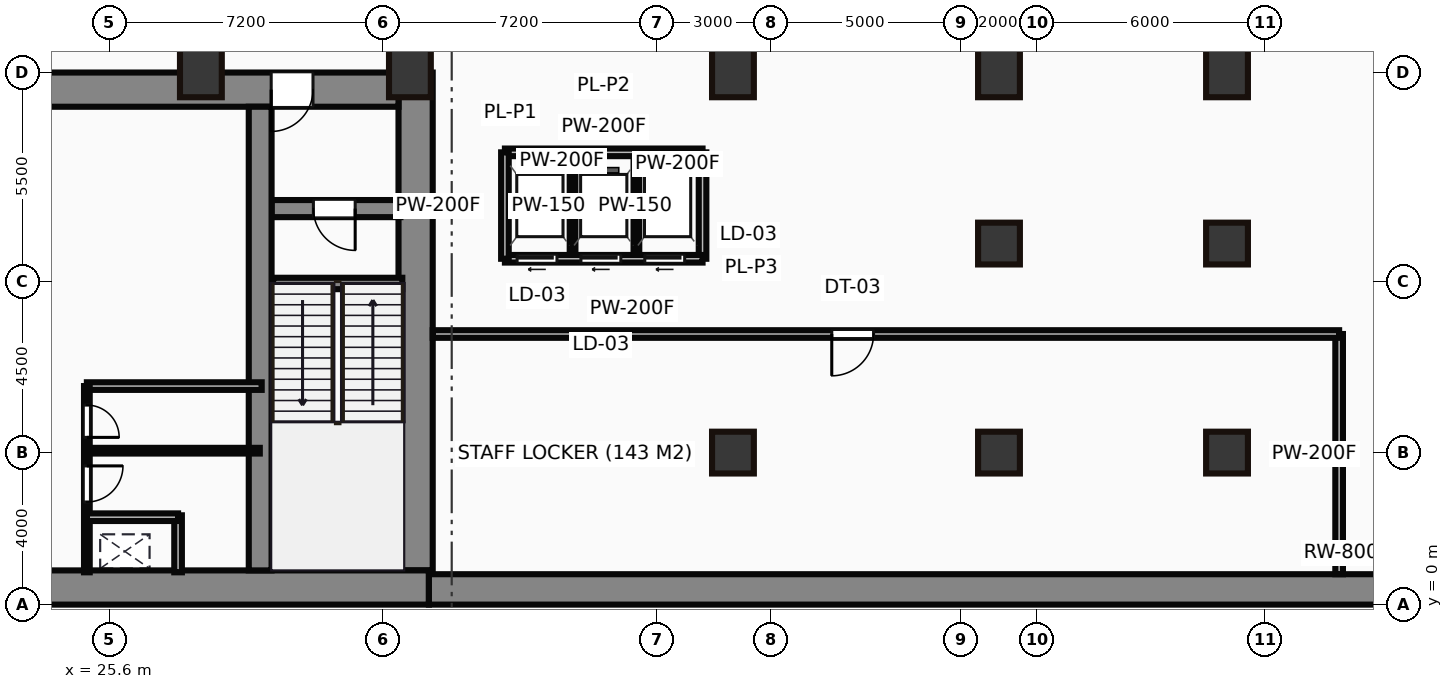
"""IFC4 building model, lengths in metres.
Left out: names, types, materials, properties, quantities, classifications, styles, units other than length and angle.
Written with IfcOpenShell. Run it as: python <this file> out.ifc"""

import sys

from ifc_helpers import new_model, si_unit, direction, frame, frame_2d, origin, origin_2d, place, context, subcontext, project, spatial, rectangle, hollow_rectangle, extrude, source, transform, mapped, element, fill, save


model = new_model("IFC4")
c1 = context("Model", 3, precision=1e-05, world=origin(), true_north=direction((0.0, 1.0)))
c2 = subcontext(c1, "Body", "Model", "MODEL_VIEW")
j1 = project(units=[si_unit("LENGTHUNIT", "METRE"), si_unit("PLANEANGLEUNIT", "RADIAN")], contexts=[c1])
p1 = place(None, origin())
s1 = spatial("IfcSite", under=j1, at=p1, CompositionType="ELEMENT")
p2 = place(p1, origin())
s2 = spatial("IfcBuilding", under=s1, at=p2, CompositionType="ELEMENT")
p3 = place(p2, frame((0.0, 0.0, -10.0)))
s3 = spatial("IfcBuildingStorey", under=s2, at=p3, CompositionType="ELEMENT", Elevation=-10.0)
m1 = source(origin(), c2, "Body", "SweptSolid", [
    extrude(rectangle(XDim=48.0, YDim=0.8, at=frame_2d((24.0, 0.0))), origin(), (0.0, 0.0, 1.0), 5.0),
])
p4 = place(p3, frame((34.0, 0.4, 0.0), z_axis=(0.0, 0.0, 1.0), x_axis=(1.0, 0.0, 0.0)))
e1 = element("IfcWall", 1, at=p4, inside=s3, PredefinedType="USERDEFINED", context=c2, shape_type="MappedRepresentation", body=[
    mapped(m1, transform((0.0, 0.0, 0.0))),
])
m2 = source(origin(), c2, "Body", "SweptSolid", [
    extrude(rectangle(XDim=29.5, YDim=0.9, at=frame_2d((14.75, 0.0))), origin(), (0.0, 0.0, 1.0), 5.0),
])
p5 = place(p3, frame((4.5, 0.45, 0.0), z_axis=(0.0, 0.0, 1.0), x_axis=(1.0, 0.0, 0.0)))
e2 = element("IfcWall", 2, at=p5, inside=s3, PredefinedType="SHEAR", context=c2, shape_type="MappedRepresentation", body=[
    mapped(m2, transform((0.0, 0.0, 0.0))),
])
m3 = source(origin(), c2, "Body", "SweptSolid", [
    extrude(rectangle(XDim=13.1, YDim=0.9, at=frame_2d((6.55, 0.0))), origin(), (0.0, 0.0, 1.0), 5.0),
])
p6 = place(p3, frame((33.65, 0.9, 0.0), z_axis=(0.0, 0.0, 1.0), x_axis=(0.0, 1.0, 0.0)))
e3 = element("IfcWall", 3, at=p6, inside=s3, PredefinedType="SHEAR", context=c2, shape_type="MappedRepresentation", body=[
    mapped(m3, transform((0.0, 0.0, 0.0))),
])
m4 = source(origin(), c2, "Body", "SweptSolid", [
    extrude(rectangle(XDim=12.6, YDim=0.9, at=frame_2d((6.3, 0.0))), origin(), (0.0, 0.0, 1.0), 4.55),
])
p7 = place(p3, frame((20.6, 13.55, 0.45), z_axis=(0.0, 0.0, 1.0), x_axis=(1.0, 0.0, 0.0)))
e4 = element("IfcWall", 4, at=p7, inside=s3, PredefinedType="SHEAR", context=c2, shape_type="MappedRepresentation", body=[
    mapped(m4, transform((0.0, 0.0, 0.0))),
])
p8 = place(p7, frame((9.25, 0.0, 0.0)))
e5 = element("IfcOpeningElement", 5, at=p8, cuts=e4, PredefinedType="OPENING", context=c2, shape_type="SweptSolid", body=[
    extrude(rectangle(XDim=1.1, YDim=2.15, at=frame_2d((0.55, 1.075))), frame((0.0, 0.46, 0.0), z_axis=(0.0, -1.0, 0.0), x_axis=(1.0, 0.0, 0.0)), (0.0, 0.0, 1.0), 0.92),
])
m5 = source(origin(), c2, "Body", "SweptSolid", [
    extrude(rectangle(XDim=12.2, YDim=0.6, at=frame_2d((6.1, 0.0))), origin(), (0.0, 0.0, 1.0), 5.0),
])
p9 = place(p3, frame((29.56, 0.9, 0.0), z_axis=(0.0, 0.0, 1.0), x_axis=(0.0, 1.0, 0.0)))
e6 = element("IfcWall", 6, at=p9, inside=s3, PredefinedType="SHEAR", context=c2, shape_type="MappedRepresentation", body=[
    mapped(m5, transform((0.0, 0.0, 0.0))),
])
m6 = source(origin(), c2, "Body", "SweptSolid", [
    extrude(rectangle(XDim=3.39, YDim=0.45, at=frame_2d((1.695, 0.0))), origin(), (0.0, 0.0, 1.0), 4.55),
])
p10 = place(p3, frame((29.86, 10.42, 0.45), z_axis=(0.0, 0.0, 1.0), x_axis=(1.0, 0.0, 0.0)))
e7 = element("IfcWall", 7, at=p10, inside=s3, PredefinedType="SHEAR", context=c2, shape_type="MappedRepresentation", body=[
    mapped(m6, transform((0.0, 0.0, 0.0))),
])
p11 = place(p10, frame((1.1, 0.0, 0.0)))
e8 = element("IfcOpeningElement", 8, at=p11, cuts=e7, PredefinedType="OPENING", context=c2, shape_type="SweptSolid", body=[
    extrude(rectangle(XDim=1.1, YDim=2.15, at=frame_2d((0.55, 1.075))), frame((0.0, 0.235, 0.0), z_axis=(0.0, -1.0, 0.0), x_axis=(1.0, 0.0, 0.0)), (0.0, 0.0, 1.0), 0.47),
])
m7 = source(origin(), c2, "Body", "SweptSolid", [
    extrude(rectangle(XDim=3.4, YDim=0.3, at=frame_2d((1.7, 0.0))), origin(), (0.0, 0.0, 1.0), 0.75),
])
p12 = place(p3, frame((29.9, 8.45, -0.3), z_axis=(0.0, 0.0, 1.0), x_axis=(1.0, 0.0, 0.0)))
e9 = element("IfcWall", 9, at=p12, inside=s3, PredefinedType="SHEAR", context=c2, shape_type="MappedRepresentation", body=[
    mapped(m7, transform((0.0, 0.0, 0.0))),
])
m8 = source(origin(), c2, "Body", "SweptSolid", [
    extrude(hollow_rectangle(XDim=1.1, YDim=1.3, WallThickness=0.055, at=origin_2d()), origin(), (0.0, 0.0, 1.0), 5.0),
])
for number, where, z_axis, x_axis in (
    (10, (28.0, 14.0, 0.0), (0.0, 0.0, 1.0), (1.0, 0.0, 0.0)),
    (11, (33.5, 14.0, 0.0), (0.0, 0.0, 1.0), (1.0, 0.0, 0.0)),
    (12, (42.0, 14.0, 0.0), (0.0, 0.0, 1.0), (1.0, 0.0, 0.0)),
    (13, (49.0, 14.0, 0.0), (0.0, 0.0, 1.0), (1.0, 0.0, 0.0)),
    (14, (55.0, 14.0, 0.0), (0.0, 0.0, 1.0), (1.0, 0.0, 0.0)),
):
    element("IfcColumn", number, at=place(p3, frame(where, z_axis=z_axis, x_axis=x_axis)), inside=s3, PredefinedType="PILASTER", context=c2, shape_type="MappedRepresentation", body=[
        mapped(m8, transform((0.0, 0.0, 0.0))),
    ])
m9 = source(origin(), c2, "Body", "SweptSolid", [
    extrude(hollow_rectangle(XDim=1.1, YDim=1.1, WallThickness=0.05, at=origin_2d()), origin(), (0.0, 0.0, 1.0), 5.0),
])
for number, where, z_axis, x_axis in (
    (15, (49.0, 9.5, 0.0), (0.0, 0.0, 1.0), (1.0, 0.0, 0.0)),
    (16, (55.0, 9.5, 0.0), (0.0, 0.0, 1.0), (1.0, 0.0, 0.0)),
    (17, (42.0, 4.0, 0.0), (0.0, 0.0, 1.0), (1.0, 0.0, 0.0)),
    (18, (49.0, 4.0, 0.0), (0.0, 0.0, 1.0), (1.0, 0.0, 0.0)),
    (19, (55.0, 4.0, 0.0), (0.0, 0.0, 1.0), (1.0, 0.0, 0.0)),
):
    element("IfcColumn", number, at=place(p3, frame(where, z_axis=z_axis, x_axis=x_axis)), inside=s3, PredefinedType="PILASTER", context=c2, shape_type="MappedRepresentation", body=[
        mapped(m9, transform((0.0, 0.0, 0.0))),
    ])
m10 = source(origin(), c2, "Body", "SweptSolid", [
    extrude(rectangle(XDim=4.9, YDim=0.15, at=frame_2d((2.45, 0.0))), origin(), (0.0, 0.0, 1.0), 4.25),
])
p13 = place(p3, frame((25.0, 0.85, 0.45), z_axis=(0.0, 0.0, 1.0), x_axis=(0.0, 1.0, 0.0)))
e20 = element("IfcWall", 20, at=p13, inside=s3, PredefinedType="PARTITIONING", context=c2, shape_type="MappedRepresentation", body=[
    mapped(m10, transform((0.0, 0.0, 0.0))),
])
p14 = place(p13, frame((1.85, 0.0, 0.0)))
e21 = element("IfcOpeningElement", 21, at=p14, cuts=e20, PredefinedType="OPENING", context=c2, shape_type="SweptSolid", body=[
    extrude(rectangle(XDim=0.95, YDim=2.15, at=frame_2d((0.475, 1.075))), frame((0.0, 0.085, 0.0), z_axis=(0.0, -1.0, 0.0), x_axis=(1.0, 0.0, 0.0)), (0.0, 0.0, 1.0), 0.17),
])
p15 = place(p13, frame((3.55, 0.0, 0.0)))
e22 = element("IfcOpeningElement", 22, at=p15, cuts=e20, PredefinedType="OPENING", context=c2, shape_type="SweptSolid", body=[
    extrude(rectangle(XDim=0.85, YDim=2.15, at=frame_2d((0.425, 1.075))), frame((0.0, 0.085, 0.0), z_axis=(0.0, -1.0, 0.0), x_axis=(1.0, 0.0, 0.0)), (0.0, 0.0, 1.0), 0.17),
])
m11 = source(origin(), c2, "Body", "SweptSolid", [
    extrude(rectangle(XDim=4.6, YDim=0.2, at=frame_2d((2.3, 0.0))), origin(), (0.0, 0.0, 1.0), 4.25),
])
p16 = place(p3, frame((25.0, 5.75, 0.45), z_axis=(0.0, 0.0, 1.0), x_axis=(1.0, 0.0, 0.0)))
e23 = element("IfcWall", 23, at=p16, inside=s3, PredefinedType="PARTITIONING", context=c2, shape_type="MappedRepresentation", body=[
    mapped(m11, transform((0.0, 0.0, 0.0))),
])
m12 = source(origin(), c2, "Body", "SweptSolid", [
    extrude(rectangle(XDim=2.4, YDim=0.2, at=frame_2d((1.2, 0.0))), origin(), (0.0, 0.0, 1.0), 4.25),
])
p17 = place(p3, frame((25.0, 2.3, 0.45), z_axis=(0.0, 0.0, 1.0), x_axis=(1.0, 0.0, 0.0)))
e24 = element("IfcWall", 24, at=p17, inside=s3, PredefinedType="PARTITIONING", context=c2, shape_type="MappedRepresentation", body=[
    mapped(m12, transform((0.0, 0.0, 0.0))),
])
m13 = source(origin(), c2, "Body", "SweptSolid", [
    extrude(rectangle(XDim=1.5, YDim=0.2, at=frame_2d((0.75, 0.0))), origin(), (0.0, 0.0, 1.0), 4.25),
])
p18 = place(p3, frame((27.4, 0.85, 0.45), z_axis=(0.0, 0.0, 1.0), x_axis=(0.0, 1.0, 0.0)))
e25 = element("IfcWall", 25, at=p18, inside=s3, PredefinedType="PARTITIONING", context=c2, shape_type="MappedRepresentation", body=[
    mapped(m13, transform((0.0, 0.0, 0.0))),
])
m14 = source(origin(), c2, "Body", "SweptSolid", [
    extrude(rectangle(XDim=4.55, YDim=0.15, at=frame_2d((2.275, 0.0))), origin(), (0.0, 0.0, 1.0), 4.25),
])
p19 = place(p3, frame((25.0, 4.05, 0.45), z_axis=(0.0, 0.0, 1.0), x_axis=(1.0, 0.0, 0.0)))
e26 = element("IfcWall", 26, at=p19, inside=s3, PredefinedType="PARTITIONING", context=c2, shape_type="MappedRepresentation", body=[
    mapped(m14, transform((0.0, 0.0, 0.0))),
])
m15 = source(origin(), c2, "Body", "SweptSolid", [
    extrude(rectangle(XDim=5.2, YDim=0.2, at=frame_2d((2.6, 0.0))), origin(), (0.0, 0.0, 1.0), 4.25),
])
p20 = place(p3, frame((36.0, 9.1, 0.45), z_axis=(0.0, 0.0, 1.0), x_axis=(1.0, 0.0, 0.0)))
e27 = element("IfcWall", 27, at=p20, inside=s3, PredefinedType="PARTITIONING", context=c2, shape_type="MappedRepresentation", body=[
    mapped(m15, transform((0.0, 0.0, 0.0))),
])
p21 = place(p20, frame((0.32, 0.0, 0.0)))
e28 = element("IfcOpeningElement", 28, at=p21, cuts=e27, PredefinedType="OPENING", context=c2, shape_type="SweptSolid", body=[
    extrude(rectangle(XDim=1.05, YDim=2.15, at=frame_2d((0.525, 1.075))), frame((0.0, 0.11, 0.0), z_axis=(0.0, -1.0, 0.0), x_axis=(1.0, 0.0, 0.0)), (0.0, 0.0, 1.0), 0.22),
])
p22 = place(p20, frame((2.0, 0.0, 0.0)))
e29 = element("IfcOpeningElement", 29, at=p22, cuts=e27, PredefinedType="OPENING", context=c2, shape_type="SweptSolid", body=[
    extrude(rectangle(XDim=1.05, YDim=2.15, at=frame_2d((0.525, 1.075))), frame((0.0, 0.11, 0.0), z_axis=(0.0, -1.0, 0.0), x_axis=(1.0, 0.0, 0.0)), (0.0, 0.0, 1.0), 0.22),
])
p23 = place(p20, frame((3.68, 0.0, 0.0)))
e30 = element("IfcOpeningElement", 30, at=p23, cuts=e27, PredefinedType="OPENING", context=c2, shape_type="SweptSolid", body=[
    extrude(rectangle(XDim=1.05, YDim=2.15, at=frame_2d((0.525, 1.075))), frame((0.0, 0.11, 0.0), z_axis=(0.0, -1.0, 0.0), x_axis=(1.0, 0.0, 0.0)), (0.0, 0.0, 1.0), 0.22),
])
p24 = place(p3, frame((36.0, 11.9, 0.45), z_axis=(0.0, 0.0, 1.0), x_axis=(1.0, 0.0, 0.0)))
e31 = element("IfcWall", 31, at=p24, inside=s3, PredefinedType="PARTITIONING", context=c2, shape_type="MappedRepresentation", body=[
    mapped(m15, transform((0.0, 0.0, 0.0))),
])
m16 = source(origin(), c2, "Body", "SweptSolid", [
    extrude(rectangle(XDim=2.8, YDim=0.2, at=frame_2d((1.4, 0.0))), origin(), (0.0, 0.0, 1.0), 4.25),
])
for number, where, z_axis, x_axis in (
    (32, (36.0, 9.1, 0.45), (0.0, 0.0, 1.0), (0.0, 1.0, 0.0)),
    (33, (41.2, 9.1, 0.45), (0.0, 0.0, 1.0), (0.0, 1.0, 0.0)),
):
    element("IfcWall", number, at=place(p3, frame(where, z_axis=z_axis, x_axis=x_axis)), inside=s3, PredefinedType="PARTITIONING", context=c2, shape_type="MappedRepresentation", body=[
        mapped(m16, transform((0.0, 0.0, 0.0))),
    ])
m17 = source(origin(), c2, "Body", "SweptSolid", [
    extrude(rectangle(XDim=2.7, YDim=0.15, at=frame_2d((1.35, 0.0))), origin(), (0.0, 0.0, 1.0), 4.25),
])
for number, where, z_axis, x_axis in (
    (34, (37.78, 9.15, 0.45), (0.0, 0.0, 1.0), (0.0, 1.0, 0.0)),
    (35, (39.46, 9.15, 0.45), (0.0, 0.0, 1.0), (0.0, 1.0, 0.0)),
):
    element("IfcWall", number, at=place(p3, frame(where, z_axis=z_axis, x_axis=x_axis)), inside=s3, PredefinedType="PARTITIONING", context=c2, shape_type="MappedRepresentation", body=[
        mapped(m17, transform((0.0, 0.0, 0.0))),
    ])
m18 = source(origin(), c2, "Body", "SweptSolid", [
    extrude(rectangle(XDim=23.85, YDim=0.2, at=frame_2d((11.925, 0.0))), origin(), (0.0, 0.0, 1.0), 4.25),
])
p25 = place(p3, frame((34.1, 7.12, 0.45), z_axis=(0.0, 0.0, 1.0), x_axis=(1.0, 0.0, 0.0)))
e36 = element("IfcWall", 36, at=p25, inside=s3, PredefinedType="PARTITIONING", context=c2, shape_type="MappedRepresentation", body=[
    mapped(m18, transform((0.0, 0.0, 0.0))),
])
p26 = place(p25, frame((10.5, 0.0, 0.0)))
e37 = element("IfcOpeningElement", 37, at=p26, cuts=e36, PredefinedType="OPENING", context=c2, shape_type="SweptSolid", body=[
    extrude(rectangle(XDim=1.1, YDim=2.15, at=frame_2d((0.55, 1.075))), frame((0.0, 0.11, 0.0), z_axis=(0.0, -1.0, 0.0), x_axis=(1.0, 0.0, 0.0)), (0.0, 0.0, 1.0), 0.22),
])
m19 = source(origin(), c2, "Body", "SweptSolid", [
    extrude(rectangle(XDim=6.32, YDim=0.2, at=frame_2d((3.16, 0.0))), origin(), (0.0, 0.0, 1.0), 4.25),
])
p27 = place(p3, frame((57.95, 0.8, 0.45), z_axis=(0.0, 0.0, 1.0), x_axis=(0.0, 1.0, 0.0)))
e38 = element("IfcWall", 38, at=p27, inside=s3, PredefinedType="PARTITIONING", context=c2, shape_type="MappedRepresentation", body=[
    mapped(m19, transform((0.0, 0.0, 0.0))),
])
m20 = source(origin(), c2, "Body", "SweptSolid", [
    extrude(rectangle(XDim=1.1, YDim=2.15, at=frame_2d((0.55, 1.075))), frame((0.0, 0.025, 0.0), z_axis=(0.0, -1.0, 0.0), x_axis=(1.0, 0.0, 0.0)), (0.0, 0.0, 1.0), 0.05),
])
p28 = place(p11, frame((1.1, 0.0, 0.0), z_axis=(0.0, 0.0, 1.0), x_axis=(-1.0, 0.0, 0.0)))
e39 = element("IfcDoor", 39, at=p28, inside=s3, OperationType="SINGLE_SWING_RIGHT", PredefinedType="DOOR", context=c2, shape_type="MappedRepresentation", body=[
    mapped(m20, transform((0.0, 0.0, 0.0))),
])
fill(e8, e39)
p29 = place(p8, origin())
e40 = element("IfcDoor", 40, at=p29, inside=s3, OperationType="SINGLE_SWING_LEFT", PredefinedType="DOOR", context=c2, shape_type="MappedRepresentation", body=[
    mapped(m20, transform((0.0, 0.0, 0.0))),
])
fill(e5, e40)
m21 = source(origin(), c2, "Body", "SweptSolid", [
    extrude(rectangle(XDim=0.95, YDim=2.15, at=frame_2d((0.475, 1.075))), frame((0.0, 0.025, 0.0), z_axis=(0.0, -1.0, 0.0), x_axis=(1.0, 0.0, 0.0)), (0.0, 0.0, 1.0), 0.05),
])
p30 = place(p14, origin())
e41 = element("IfcDoor", 41, at=p30, inside=s3, OperationType="SINGLE_SWING_RIGHT", PredefinedType="DOOR", context=c2, shape_type="MappedRepresentation", body=[
    mapped(m21, transform((0.0, 0.0, 0.0))),
])
fill(e21, e41)
m22 = source(origin(), c2, "Body", "SweptSolid", [
    extrude(rectangle(XDim=0.85, YDim=2.15, at=frame_2d((0.425, 1.075))), frame((0.0, 0.025, 0.0), z_axis=(0.0, -1.0, 0.0), x_axis=(1.0, 0.0, 0.0)), (0.0, 0.0, 1.0), 0.05),
])
p31 = place(p15, origin())
e42 = element("IfcDoor", 42, at=p31, inside=s3, OperationType="SINGLE_SWING_LEFT", PredefinedType="DOOR", context=c2, shape_type="MappedRepresentation", body=[
    mapped(m22, transform((0.0, 0.0, 0.0))),
])
fill(e22, e42)
m23 = source(origin(), c2, "Body", "SweptSolid", [
    extrude(rectangle(XDim=1.05, YDim=2.15, at=frame_2d((0.525, 1.075))), frame((0.0, 0.025, 0.0), z_axis=(0.0, -1.0, 0.0), x_axis=(1.0, 0.0, 0.0)), (0.0, 0.0, 1.0), 0.05),
])
p32 = place(p21, frame((1.05, 0.0, 0.0), z_axis=(0.0, 0.0, 1.0), x_axis=(-1.0, 0.0, 0.0)))
e43 = element("IfcDoor", 43, at=p32, inside=s3, OperationType="SLIDING_TO_LEFT", PredefinedType="DOOR", context=c2, shape_type="MappedRepresentation", body=[
    mapped(m23, transform((0.0, 0.0, 0.0))),
])
fill(e28, e43)
p33 = place(p22, frame((1.05, 0.0, 0.0), z_axis=(0.0, 0.0, 1.0), x_axis=(-1.0, 0.0, 0.0)))
e44 = element("IfcDoor", 44, at=p33, inside=s3, OperationType="SLIDING_TO_LEFT", PredefinedType="DOOR", context=c2, shape_type="MappedRepresentation", body=[
    mapped(m23, transform((0.0, 0.0, 0.0))),
])
fill(e29, e44)
p34 = place(p23, frame((1.05, 0.0, 0.0), z_axis=(0.0, 0.0, 1.0), x_axis=(-1.0, 0.0, 0.0)))
e45 = element("IfcDoor", 45, at=p34, inside=s3, OperationType="SLIDING_TO_LEFT", PredefinedType="DOOR", context=c2, shape_type="MappedRepresentation", body=[
    mapped(m23, transform((0.0, 0.0, 0.0))),
])
fill(e30, e45)
p35 = place(p26, frame((1.1, 0.0, 0.0), z_axis=(0.0, 0.0, 1.0), x_axis=(-1.0, 0.0, 0.0)))
e46 = element("IfcDoor", 46, at=p35, inside=s3, OperationType="SINGLE_SWING_LEFT", PredefinedType="DOOR", context=c2, shape_type="MappedRepresentation", body=[
    mapped(m20, transform((0.0, 0.0, 0.0))),
])
fill(e37, e46)
save(model, sys.argv[1])
